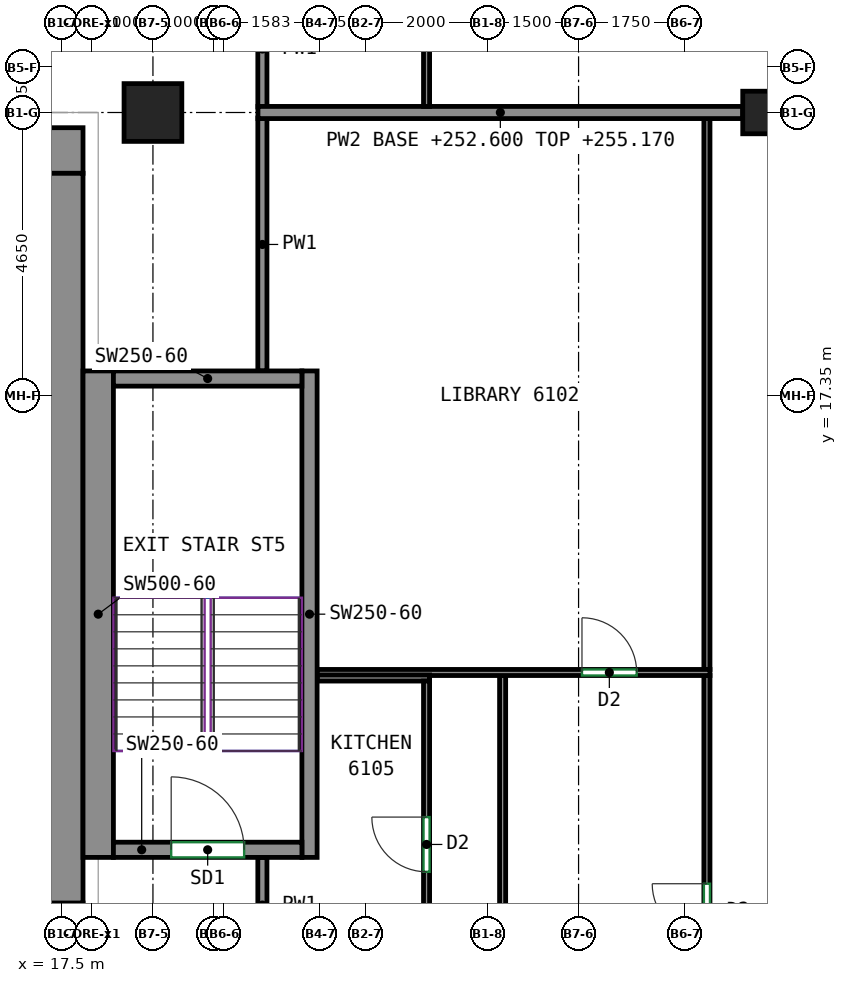
"""IFC4 building model, lengths in metres.
Left out: names, types, materials, properties, quantities, classifications, styles, units other than length and angle.
Written with IfcOpenShell. Run it as: python <this file> out.ifc"""

import sys

from ifc_helpers import new_model, si_unit, direction, frame, frame_2d, origin, origin_2d, place, context, subcontext, project, spatial, rectangle, extrude, source, transform, mapped, element, fill, save


model = new_model("IFC4")
c1 = context("Model", 3, precision=1e-05, world=origin(), true_north=direction((0.0, 1.0)))
c2 = subcontext(c1, "Body", "Model", "MODEL_VIEW")
j1 = project(units=[si_unit("LENGTHUNIT", "METRE"), si_unit("PLANEANGLEUNIT", "RADIAN")], contexts=[c1])
p1 = place(None, origin())
s1 = spatial("IfcSite", under=j1, at=p1, CompositionType="ELEMENT")
p2 = place(p1, origin())
s2 = spatial("IfcBuilding", under=s1, at=p2, CompositionType="ELEMENT")
p3 = place(p2, frame((0.0, 0.0, 252.6)))
s3 = spatial("IfcBuildingStorey", under=s2, at=p3, CompositionType="ELEMENT", Elevation=252.6)
m1 = source(origin(), c2, "Body", "SweptSolid", [
    extrude(rectangle(XDim=0.95, YDim=0.95, at=origin_2d()), origin(), (0.0, 0.0, 1.0), 3.12),
])
p4 = place(p3, frame((19.0, 22.0, 0.0), z_axis=(0.0, 0.0, 1.0), x_axis=(1.0, 0.0, 0.0)))
e1 = element("IfcColumn", 1, at=p4, inside=s3, PredefinedType="COLUMN", context=c2, shape_type="MappedRepresentation", body=[
    mapped(m1, transform((0.0, 0.0, 0.0))),
])
m2 = source(origin(), c2, "Body", "SweptSolid", [
    extrude(rectangle(XDim=0.7, YDim=0.7, at=origin_2d()), origin(), (0.0, 0.0, 1.0), 3.12),
])
p5 = place(p3, frame((29.05, 22.0, 0.0), z_axis=(0.0, 0.0, 1.0), x_axis=(1.0, 0.0, 0.0)))
e2 = element("IfcColumn", 2, at=p5, inside=s3, PredefinedType="COLUMN", context=c2, shape_type="MappedRepresentation", body=[
    mapped(m2, transform((0.0, 0.0, 0.0))),
])
m3 = source(origin(), c2, "Body", "SweptSolid", [
    extrude(rectangle(XDim=33.6, YDim=0.75, at=frame_2d((16.8, 0.0))), origin(), (0.0, 0.0, 1.0), 3.12),
])
p6 = place(p3, frame((-15.75, 21.375, 0.0), z_axis=(0.0, 0.0, 1.0), x_axis=(1.0, 0.0, 0.0)))
e3 = element("IfcWall", 3, at=p6, inside=s3, PredefinedType="SHEAR", context=c2, shape_type="MappedRepresentation", body=[
    mapped(m3, transform((0.0, 0.0, 0.0))),
])
p7 = place(p6, frame((6.581, 0.0, 0.0)))
e4 = element("IfcOpeningElement", 4, at=p7, cuts=e3, PredefinedType="OPENING", context=c2, shape_type="SweptSolid", body=[
    extrude(rectangle(XDim=0.9, YDim=2.1, at=frame_2d((0.45, 1.05))), frame((0.0, 0.385, 0.0), z_axis=(0.0, -1.0, 0.0), x_axis=(1.0, 0.0, 0.0)), (0.0, 0.0, 1.0), 0.77),
])
p8 = place(p6, frame((11.888, 0.0, 0.0)))
e5 = element("IfcOpeningElement", 5, at=p8, cuts=e3, PredefinedType="OPENING", context=c2, shape_type="SweptSolid", body=[
    extrude(rectangle(XDim=0.9, YDim=2.1, at=frame_2d((0.45, 1.05))), frame((0.0, 0.385, 0.0), z_axis=(0.0, -1.0, 0.0), x_axis=(1.0, 0.0, 0.0)), (0.0, 0.0, 1.0), 0.77),
])
p9 = place(p6, frame((17.315, 0.0, 0.0)))
e6 = element("IfcOpeningElement", 6, at=p9, cuts=e3, PredefinedType="OPENING", context=c2, shape_type="SweptSolid", body=[
    extrude(rectangle(XDim=0.9, YDim=2.1, at=frame_2d((0.45, 1.05))), frame((0.0, 0.385, 0.0), z_axis=(0.0, -1.0, 0.0), x_axis=(1.0, 0.0, 0.0)), (0.0, 0.0, 1.0), 0.77),
])
p10 = place(p6, frame((21.536, 0.0, 0.0)))
e7 = element("IfcOpeningElement", 7, at=p10, cuts=e3, PredefinedType="OPENING", context=c2, shape_type="SweptSolid", body=[
    extrude(rectangle(XDim=0.9, YDim=2.1, at=frame_2d((0.45, 1.05))), frame((0.0, 0.385, 0.0), z_axis=(0.0, -1.0, 0.0), x_axis=(1.0, 0.0, 0.0)), (0.0, 0.0, 1.0), 0.77),
])
p11 = place(p6, frame((24.537, 0.0, 0.0)))
e8 = element("IfcOpeningElement", 8, at=p11, cuts=e3, PredefinedType="OPENING", context=c2, shape_type="SweptSolid", body=[
    extrude(rectangle(XDim=0.9, YDim=2.1, at=frame_2d((0.45, 1.05))), frame((0.0, 0.385, 0.0), z_axis=(0.0, -1.0, 0.0), x_axis=(1.0, 0.0, 0.0)), (0.0, 0.0, 1.0), 0.77),
])
p12 = place(p6, frame((27.07, 0.0, 0.0)))
e9 = element("IfcOpeningElement", 9, at=p12, cuts=e3, PredefinedType="OPENING", context=c2, shape_type="SweptSolid", body=[
    extrude(rectangle(XDim=0.9, YDim=2.1, at=frame_2d((0.45, 1.05))), frame((0.0, 0.385, 0.0), z_axis=(0.0, -1.0, 0.0), x_axis=(1.0, 0.0, 0.0)), (0.0, 0.0, 1.0), 0.77),
])
p13 = place(p6, frame((2.275, 0.0, 0.0)))
e10 = element("IfcOpeningElement", 10, at=p13, cuts=e3, PredefinedType="OPENING", context=c2, shape_type="SweptSolid", body=[
    extrude(rectangle(XDim=0.9, YDim=2.1, at=frame_2d((0.45, 1.05))), frame((0.0, 0.385, 0.0), z_axis=(0.0, -1.0, 0.0), x_axis=(1.0, 0.0, 0.0)), (0.0, 0.0, 1.0), 0.77),
])
p14 = place(p6, frame((30.425, 0.0, 0.0)))
e11 = element("IfcOpeningElement", 11, at=p14, cuts=e3, PredefinedType="OPENING", context=c2, shape_type="SweptSolid", body=[
    extrude(rectangle(XDim=0.9, YDim=2.1, at=frame_2d((0.45, 1.05))), frame((0.0, 0.385, 0.0), z_axis=(0.0, -1.0, 0.0), x_axis=(1.0, 0.0, 0.0)), (0.0, 0.0, 1.0), 0.77),
])
m4 = source(origin(), c2, "Body", "SweptSolid", [
    extrude(rectangle(XDim=12.0, YDim=0.75, at=frame_2d((6.0, 0.0))), origin(), (0.0, 0.0, 1.0), 3.12),
])
p15 = place(p3, frame((17.475, 9.0, 0.0), z_axis=(0.0, 0.0, 1.0), x_axis=(0.0, 1.0, 0.0)))
e12 = element("IfcWall", 12, at=p15, inside=s3, PredefinedType="SHEAR", context=c2, shape_type="MappedRepresentation", body=[
    mapped(m4, transform((0.0, 0.0, 0.0))),
])
m5 = source(origin(), c2, "Body", "SweptSolid", [
    extrude(rectangle(XDim=8.0, YDim=0.5, at=frame_2d((4.0, 0.0))), origin(), (0.0, 0.0, 1.0), 3.12),
])
p16 = place(p3, frame((18.1, 9.75, 0.0), z_axis=(0.0, 0.0, 1.0), x_axis=(0.0, 1.0, 0.0)))
e13 = element("IfcWall", 13, at=p16, inside=s3, PredefinedType="SHEAR", context=c2, shape_type="MappedRepresentation", body=[
    mapped(m5, transform((0.0, 0.0, 0.0))),
])
m6 = source(origin(), c2, "Body", "SweptSolid", [
    extrude(rectangle(XDim=8.0, YDim=0.25, at=frame_2d((4.0, 0.0))), origin(), (0.0, 0.0, 1.0), 3.12),
])
p17 = place(p3, frame((21.575, 9.75, 0.0), z_axis=(0.0, 0.0, 1.0), x_axis=(0.0, 1.0, 0.0)))
e14 = element("IfcWall", 14, at=p17, inside=s3, PredefinedType="SHEAR", context=c2, shape_type="MappedRepresentation", body=[
    mapped(m6, transform((0.0, 0.0, 0.0))),
])
m7 = source(origin(), c2, "Body", "SweptSolid", [
    extrude(rectangle(XDim=3.1, YDim=0.25, at=frame_2d((1.55, 0.0))), origin(), (0.0, 0.0, 1.0), 3.12),
])
p18 = place(p3, frame((18.35, 9.875, 0.0), z_axis=(0.0, 0.0, 1.0), x_axis=(1.0, 0.0, 0.0)))
e15 = element("IfcWall", 15, at=p18, inside=s3, PredefinedType="SHEAR", context=c2, shape_type="MappedRepresentation", body=[
    mapped(m7, transform((0.0, 0.0, 0.0))),
])
p19 = place(p18, frame((0.95, 0.0, 0.0)))
e16 = element("IfcOpeningElement", 16, at=p19, cuts=e15, PredefinedType="OPENING", context=c2, shape_type="SweptSolid", body=[
    extrude(rectangle(XDim=1.2, YDim=2.1, at=frame_2d((0.6, 1.05))), frame((0.0, 0.135, 0.0), z_axis=(0.0, -1.0, 0.0), x_axis=(1.0, 0.0, 0.0)), (0.0, 0.0, 1.0), 0.27),
])
p20 = place(p3, frame((18.35, 17.625, 0.0), z_axis=(0.0, 0.0, 1.0), x_axis=(1.0, 0.0, 0.0)))
e17 = element("IfcWall", 17, at=p20, inside=s3, PredefinedType="SHEAR", context=c2, shape_type="MappedRepresentation", body=[
    mapped(m7, transform((0.0, 0.0, 0.0))),
])
p21 = place(p3, frame((20.8, 17.75, 0.0), z_axis=(0.0, 0.0, 1.0), x_axis=(0.0, 1.0, 0.0)))
e18 = element("IfcWall", 18, at=p21, inside=s3, PredefinedType="PARTITIONING", context=c2, shape_type="SweptSolid", body=[
    extrude(rectangle(XDim=4.16, YDim=0.15, at=frame_2d((2.08, 0.0))), origin(), (0.0, 0.0, 1.0), 3.12),
])
p22 = place(p3, frame((20.8, 8.182, 0.0), z_axis=(0.0, 0.0, 1.0), x_axis=(0.0, 1.0, 0.0)))
e19 = element("IfcWall", 19, at=p22, inside=s3, PredefinedType="PARTITIONING", context=c2, shape_type="SweptSolid", body=[
    extrude(rectangle(XDim=1.568, YDim=0.15, at=frame_2d((0.784, 0.0))), origin(), (0.0, 0.0, 1.0), 3.12),
])
p23 = place(p3, frame((20.8, 22.09, 0.0), z_axis=(0.0, 0.0, 1.0), x_axis=(0.0, 1.0, 0.0)))
e20 = element("IfcWall", 20, at=p23, inside=s3, PredefinedType="PARTITIONING", context=c2, shape_type="SweptSolid", body=[
    extrude(rectangle(XDim=1.908, YDim=0.15, at=frame_2d((0.954, 0.0))), origin(), (0.0, 0.0, 1.0), 3.12),
])
p24 = place(p3, frame((28.111, 3.683, 0.0), z_axis=(0.0, 0.0, 1.0), x_axis=(0.0, 1.0, 0.0)))
e21 = element("IfcWall", 21, at=p24, inside=s3, PredefinedType="PARTITIONING", context=c2, shape_type="SweptSolid", body=[
    extrude(rectangle(XDim=9.058, YDim=0.1, at=frame_2d((4.529, 0.0))), origin(), (0.0, 0.0, 1.0), 3.12),
])
p25 = place(p24, frame((4.734, 0.0, 0.0)))
e22 = element("IfcOpeningElement", 22, at=p25, cuts=e21, PredefinedType="OPENING", context=c2, shape_type="SweptSolid", body=[
    extrude(rectangle(XDim=0.9, YDim=2.1, at=frame_2d((0.45, 1.05))), frame((0.0, 0.06, 0.0), z_axis=(0.0, -1.0, 0.0), x_axis=(1.0, 0.0, 0.0)), (0.0, 0.0, 1.0), 0.12),
])
p26 = place(p3, frame((24.751, 12.741, 0.0), z_axis=(0.0, 0.0, 1.0), x_axis=(0.0, -1.0, 0.0)))
e23 = element("IfcWall", 23, at=p26, inside=s3, PredefinedType="PARTITIONING", context=c2, shape_type="SweptSolid", body=[
    extrude(rectangle(XDim=5.8, YDim=0.1, at=frame_2d((2.9, 0.0))), origin(), (0.0, 0.0, 1.0), 3.12),
])
p27 = place(p3, frame((28.111, 12.841, 0.0), z_axis=(0.0, 0.0, 1.0), x_axis=(0.0, 1.0, 0.0)))
e24 = element("IfcWall", 24, at=p27, inside=s3, PredefinedType="PARTITIONING", context=c2, shape_type="SweptSolid", body=[
    extrude(rectangle(XDim=9.059, YDim=0.1, at=frame_2d((4.529, 0.0))), origin(), (0.0, 0.0, 1.0), 3.12),
])
p28 = place(p3, frame((20.727, 22.0, 0.0), z_axis=(0.0, 0.0, 1.0), x_axis=(1.0, 0.0, 0.0)))
e25 = element("IfcWall", 25, at=p28, inside=s3, PredefinedType="PARTITIONING", context=c2, shape_type="SweptSolid", body=[
    extrude(rectangle(XDim=7.973, YDim=0.2, at=frame_2d((3.986, 0.0))), origin(), (0.0, 0.0, 1.0), 2.57),
])
p29 = place(p3, frame((21.7, 12.791, 0.0), z_axis=(0.0, 0.0, 1.0), x_axis=(1.0, 0.0, 0.0)))
e26 = element("IfcWall", 26, at=p29, inside=s3, PredefinedType="PARTITIONING", context=c2, shape_type="SweptSolid", body=[
    extrude(rectangle(XDim=6.461, YDim=0.1, at=frame_2d((3.23, 0.0))), origin(), (0.0, 0.0, 1.0), 3.12),
])
p30 = place(p29, frame((4.356, 0.0, 0.0)))
e27 = element("IfcOpeningElement", 27, at=p30, cuts=e26, PredefinedType="OPENING", context=c2, shape_type="SweptSolid", body=[
    extrude(rectangle(XDim=0.9, YDim=2.1, at=frame_2d((0.45, 1.05))), frame((0.0, 0.06, 0.0), z_axis=(0.0, -1.0, 0.0), x_axis=(1.0, 0.0, 0.0)), (0.0, 0.0, 1.0), 0.12),
])
p31 = place(p3, frame((23.55, 12.7, 0.0), z_axis=(0.0, 0.0, 1.0), x_axis=(-1.0, 0.0, 0.0)))
e28 = element("IfcWall", 28, at=p31, inside=s3, PredefinedType="PARTITIONING", context=c2, shape_type="SweptSolid", body=[
    extrude(rectangle(XDim=1.85, YDim=0.1, at=frame_2d((0.925, 0.0))), origin(), (0.0, 0.0, 1.0), 3.12),
])
p32 = place(p3, frame((23.5, 8.192, 0.0), z_axis=(0.0, 0.0, 1.0), x_axis=(0.0, 1.0, 0.0)))
e29 = element("IfcWall", 29, at=p32, inside=s3, PredefinedType="PARTITIONING", context=c2, shape_type="SweptSolid", body=[
    extrude(rectangle(XDim=4.458, YDim=0.1, at=frame_2d((2.229, 0.0))), origin(), (0.0, 0.0, 1.0), 3.12),
])
p33 = place(p32, frame((1.321, 0.0, 0.0)))
e30 = element("IfcOpeningElement", 30, at=p33, cuts=e29, PredefinedType="OPENING", context=c2, shape_type="SweptSolid", body=[
    extrude(rectangle(XDim=0.9, YDim=2.1, at=frame_2d((0.45, 1.05))), frame((0.0, 0.06, 0.0), z_axis=(0.0, -1.0, 0.0), x_axis=(1.0, 0.0, 0.0)), (0.0, 0.0, 1.0), 0.12),
])
p34 = place(p3, frame((23.5, 22.1, 0.0), z_axis=(0.0, 0.0, 1.0), x_axis=(0.0, 1.0, 0.0)))
e31 = element("IfcWall", 31, at=p34, inside=s3, PredefinedType="PARTITIONING", context=c2, shape_type="SweptSolid", body=[
    extrude(rectangle(XDim=4.598, YDim=0.1, at=frame_2d((2.299, 0.0))), origin(), (0.0, 0.0, 1.0), 3.12),
])
p35 = place(p19, origin())
e32 = element("IfcDoor", 32, at=p35, inside=s3, OperationType="DOUBLE_DOOR_SINGLE_SWING", PredefinedType="DOOR", context=c2, shape_type="SweptSolid", body=[
    extrude(rectangle(XDim=1.2, YDim=2.1, at=frame_2d((0.6, 1.05))), frame((0.0, 0.025, 0.0), z_axis=(0.0, -1.0, 0.0), x_axis=(1.0, 0.0, 0.0)), (0.0, 0.0, 1.0), 0.05),
])
fill(e16, e32)
p36 = place(p25, origin())
e33 = element("IfcDoor", 33, at=p36, inside=s3, OperationType="SINGLE_SWING_RIGHT", PredefinedType="DOOR", context=c2, shape_type="SweptSolid", body=[
    extrude(rectangle(XDim=0.9, YDim=2.1, at=frame_2d((0.45, 1.05))), frame((0.0, 0.025, 0.0), z_axis=(0.0, -1.0, 0.0), x_axis=(1.0, 0.0, 0.0)), (0.0, 0.0, 1.0), 0.05),
])
fill(e22, e33)
p37 = place(p33, origin())
e34 = element("IfcDoor", 34, at=p37, inside=s3, OperationType="SINGLE_SWING_RIGHT", PredefinedType="DOOR", context=c2, shape_type="SweptSolid", body=[
    extrude(rectangle(XDim=0.9, YDim=2.1, at=frame_2d((0.45, 1.05))), frame((0.0, 0.025, 0.0), z_axis=(0.0, -1.0, 0.0), x_axis=(1.0, 0.0, 0.0)), (0.0, 0.0, 1.0), 0.05),
])
fill(e30, e34)
p38 = place(p30, origin())
e35 = element("IfcDoor", 35, at=p38, inside=s3, OperationType="SINGLE_SWING_LEFT", PredefinedType="DOOR", context=c2, shape_type="SweptSolid", body=[
    extrude(rectangle(XDim=0.9, YDim=2.1, at=frame_2d((0.45, 1.05))), frame((0.0, 0.025, 0.0), z_axis=(0.0, -1.0, 0.0), x_axis=(1.0, 0.0, 0.0)), (0.0, 0.0, 1.0), 0.05),
])
fill(e27, e35)
save(model, sys.argv[1])
